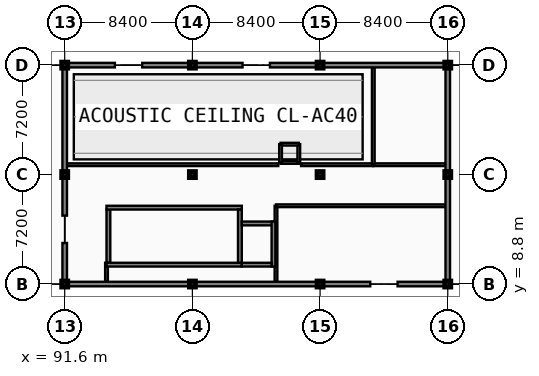
"""IFC4 building model, lengths in metres.
Left out: names, types, materials, properties, quantities, classifications, styles, units other than length and angle.
Written with IfcOpenShell. Run it as: python <this file> out.ifc"""

import sys

from ifc_helpers import new_model, si_unit, direction, frame, frame_2d, origin, origin_2d, place, context, subcontext, project, spatial, rectangle, extrude, element, fill, save


model = new_model("IFC4")
c1 = context("Model", 3, precision=1e-05, world=origin(), true_north=direction((0.0, 1.0)))
c2 = subcontext(c1, "Body", "Model", "MODEL_VIEW")
j1 = project(units=[si_unit("LENGTHUNIT", "METRE"), si_unit("PLANEANGLEUNIT", "RADIAN")], contexts=[c1])
p1 = place(None, origin())
s1 = spatial("IfcSite", under=j1, at=p1, CompositionType="ELEMENT")
p2 = place(p1, origin())
s2 = spatial("IfcBuilding", under=s1, at=p2, CompositionType="ELEMENT")
p3 = place(p2, frame((0.0, 0.0, 5.4)))
s3 = spatial("IfcBuildingStorey", under=s2, at=p3, CompositionType="ELEMENT", Elevation=5.4)
for number, where, z_axis, x_axis in (
    (1, (91.6, 8.8, 0.0), (0.0, 0.0, 1.0), (1.0, 0.0, 0.0)),
    (2, (91.6, 16.0, 0.0), (0.0, 0.0, 1.0), (1.0, 0.0, 0.0)),
    (3, (91.6, 23.2, 0.0), (0.0, 0.0, 1.0), (1.0, 0.0, 0.0)),
    (4, (100.0, 8.8, 0.0), (0.0, 0.0, 1.0), (1.0, 0.0, 0.0)),
    (5, (100.0, 16.0, 0.0), (0.0, 0.0, 1.0), (1.0, 0.0, 0.0)),
    (6, (100.0, 23.2, 0.0), (0.0, 0.0, 1.0), (1.0, 0.0, 0.0)),
    (7, (108.4, 8.8, 0.0), (0.0, 0.0, 1.0), (1.0, 0.0, 0.0)),
    (8, (108.4, 16.0, 0.0), (0.0, 0.0, 1.0), (1.0, 0.0, 0.0)),
    (9, (108.4, 23.2, 0.0), (0.0, 0.0, 1.0), (1.0, 0.0, 0.0)),
    (10, (116.8, 8.8, 0.0), (0.0, 0.0, 1.0), (1.0, 0.0, 0.0)),
    (11, (116.8, 16.0, 0.0), (0.0, 0.0, 1.0), (1.0, 0.0, 0.0)),
    (12, (116.8, 23.2, 0.0), (0.0, 0.0, 1.0), (1.0, 0.0, 0.0)),
):
    element("IfcColumn", number, at=place(p3, frame(where, z_axis=z_axis, x_axis=x_axis)), inside=s3, PredefinedType="COLUMN", context=c2, shape_type="SweptSolid", body=[
        extrude(rectangle(XDim=0.4, YDim=0.4, at=origin_2d()), origin(), (0.0, 0.0, 1.0), 4.2),
    ])
p4 = place(p3, frame((94.35, 8.96, 0.0), z_axis=(0.0, 0.0, 1.0), x_axis=(0.0, 1.0, 0.0)))
e13 = element("IfcWall", 13, at=p4, inside=s3, PredefinedType="PARTITIONING", context=c2, shape_type="SweptSolid", body=[
    extrude(rectangle(XDim=1.24, YDim=0.18, at=frame_2d((0.62, 0.0))), origin(), (0.0, 0.0, 1.0), 3.52),
])
p5 = place(p3, frame((105.5, 8.94, 0.0), z_axis=(0.0, 0.0, 1.0), x_axis=(0.0, 1.0, 0.0)))
e14 = element("IfcWall", 14, at=p5, inside=s3, PredefinedType="PARTITIONING", context=c2, shape_type="SweptSolid", body=[
    extrude(rectangle(XDim=5.01, YDim=0.18, at=frame_2d((2.505, 0.0))), origin(), (0.0, 0.0, 1.0), 3.52),
])
p6 = place(p3, frame((105.5, 13.95, 0.0), z_axis=(0.0, 0.0, 1.0), x_axis=(1.0, 0.0, 0.0)))
e15 = element("IfcWall", 15, at=p6, inside=s3, PredefinedType="PARTITIONING", context=c2, shape_type="SweptSolid", body=[
    extrude(rectangle(XDim=11.16, YDim=0.18, at=frame_2d((5.58, 0.0))), origin(), (0.0, 0.0, 1.0), 3.21),
])
p7 = place(p6, frame((5.08, 0.0, -0.01)))
e16 = element("IfcOpeningElement", 16, at=p7, cuts=e15, PredefinedType="OPENING", context=c2, shape_type="SweptSolid", body=[
    extrude(rectangle(XDim=1.0, YDim=2.16, at=frame_2d((0.5, 1.08))), frame((0.0, 0.1, 0.0), z_axis=(0.0, -1.0, 0.0), x_axis=(1.0, 0.0, 0.0)), (0.0, 0.0, 1.0), 0.2),
])
p8 = place(p3, frame((91.74, 16.65, 0.0), z_axis=(0.0, 0.0, 1.0), x_axis=(1.0, 0.0, 0.0)))
e17 = element("IfcWall", 17, at=p8, inside=s3, PredefinedType="PARTITIONING", context=c2, shape_type="SweptSolid", body=[
    extrude(rectangle(XDim=13.91, YDim=0.18, at=frame_2d((6.955, 0.0))), origin(), (0.0, 0.0, 1.0), 3.21),
])
p9 = place(p8, frame((5.54, 0.0, -0.01)))
e18 = element("IfcOpeningElement", 18, at=p9, cuts=e17, PredefinedType="OPENING", context=c2, shape_type="SweptSolid", body=[
    extrude(rectangle(XDim=1.6, YDim=2.21, at=frame_2d((0.8, 1.105))), frame((0.0, 0.1, 0.0), z_axis=(0.0, -1.0, 0.0), x_axis=(1.0, 0.0, 0.0)), (0.0, 0.0, 1.0), 0.2),
])
p10 = place(p3, frame((107.15, 16.65, 0.0), z_axis=(0.0, 0.0, 1.0), x_axis=(1.0, 0.0, 0.0)))
e19 = element("IfcWall", 19, at=p10, inside=s3, PredefinedType="PARTITIONING", context=c2, shape_type="SweptSolid", body=[
    extrude(rectangle(XDim=4.75, YDim=0.18, at=frame_2d((2.375, 0.0))), origin(), (0.0, 0.0, 1.0), 3.37),
])
p11 = place(p3, frame((111.9, 16.65, 0.0), z_axis=(0.0, 0.0, 1.0), x_axis=(1.0, 0.0, 0.0)))
e20 = element("IfcWall", 20, at=p11, inside=s3, PredefinedType="PARTITIONING", context=c2, shape_type="SweptSolid", body=[
    extrude(rectangle(XDim=4.76, YDim=0.18, at=frame_2d((2.38, 0.0))), origin(), (0.0, 0.0, 1.0), 3.21),
])
p12 = place(p11, frame((1.88, 0.0, -0.01)))
e21 = element("IfcOpeningElement", 21, at=p12, cuts=e20, PredefinedType="OPENING", context=c2, shape_type="SweptSolid", body=[
    extrude(rectangle(XDim=1.0, YDim=2.16, at=frame_2d((0.5, 1.08))), frame((0.0, 0.1, 0.0), z_axis=(0.0, -1.0, 0.0), x_axis=(1.0, 0.0, 0.0)), (0.0, 0.0, 1.0), 0.2),
])
p13 = place(p3, frame((111.9, 16.65, 0.0), z_axis=(0.0, 0.0, 1.0), x_axis=(0.0, 1.0, 0.0)))
e22 = element("IfcWall", 22, at=p13, inside=s3, PredefinedType="PARTITIONING", context=c2, shape_type="SweptSolid", body=[
    extrude(rectangle(XDim=6.41, YDim=0.18, at=frame_2d((3.205, 0.0))), origin(), (0.0, 0.0, 1.0), 3.52),
])
p14 = place(p3, frame((91.6, 8.8, 0.0), z_axis=(0.0, 0.0, 1.0), x_axis=(1.0, 0.0, 0.0)))
e23 = element("IfcWall", 23, at=p14, inside=s3, PredefinedType="SOLIDWALL", context=c2, shape_type="SweptSolid", body=[
    extrude(rectangle(XDim=8.4, YDim=0.3, at=frame_2d((4.2, 0.0))), origin(), (0.0, 0.0, 1.0), 3.21),
])
p15 = place(p14, frame((0.46, 0.0, 0.85)))
e24 = element("IfcOpeningElement", 24, at=p15, cuts=e23, PredefinedType="OPENING", context=c2, shape_type="SweptSolid", body=[
    extrude(rectangle(XDim=0.9, YDim=2.15, at=frame_2d((0.45, 1.075))), frame((0.0, 0.16, 0.0), z_axis=(0.0, -1.0, 0.0), x_axis=(1.0, 0.0, 0.0)), (0.0, 0.0, 1.0), 0.32),
])
p16 = place(p14, frame((6.86, 0.0, 0.85)))
e25 = element("IfcOpeningElement", 25, at=p16, cuts=e23, PredefinedType="OPENING", context=c2, shape_type="SweptSolid", body=[
    extrude(rectangle(XDim=0.9, YDim=2.15, at=frame_2d((0.45, 1.075))), frame((0.0, 0.16, 0.0), z_axis=(0.0, -1.0, 0.0), x_axis=(1.0, 0.0, 0.0)), (0.0, 0.0, 1.0), 0.32),
])
p17 = place(p3, frame((100.0, 8.8, 0.0), z_axis=(0.0, 0.0, 1.0), x_axis=(1.0, 0.0, 0.0)))
e26 = element("IfcWall", 26, at=p17, inside=s3, PredefinedType="SOLIDWALL", context=c2, shape_type="SweptSolid", body=[
    extrude(rectangle(XDim=8.4, YDim=0.3, at=frame_2d((4.2, 0.0))), origin(), (0.0, 0.0, 1.0), 3.37),
])
p18 = place(p17, frame((0.46, 0.0, 0.85)))
e27 = element("IfcOpeningElement", 27, at=p18, cuts=e26, PredefinedType="OPENING", context=c2, shape_type="SweptSolid", body=[
    extrude(rectangle(XDim=0.9, YDim=2.15, at=frame_2d((0.45, 1.075))), frame((0.0, 0.16, 0.0), z_axis=(0.0, -1.0, 0.0), x_axis=(1.0, 0.0, 0.0)), (0.0, 0.0, 1.0), 0.32),
])
p19 = place(p17, frame((6.86, 0.0, 0.85)))
e28 = element("IfcOpeningElement", 28, at=p19, cuts=e26, PredefinedType="OPENING", context=c2, shape_type="SweptSolid", body=[
    extrude(rectangle(XDim=0.9, YDim=2.15, at=frame_2d((0.45, 1.075))), frame((0.0, 0.16, 0.0), z_axis=(0.0, -1.0, 0.0), x_axis=(1.0, 0.0, 0.0)), (0.0, 0.0, 1.0), 0.32),
])
for number, where, z_axis, x_axis in (
    (29, (108.4, 8.8, 0.0), (0.0, 0.0, 1.0), (1.0, 0.0, 0.0)),
    (30, (113.5, 8.8, 0.0), (0.0, 0.0, 1.0), (1.0, 0.0, 0.0)),
    (31, (100.0, 23.2, 0.0), (0.0, 0.0, 1.0), (-1.0, 0.0, 0.0)),
):
    element("IfcWall", number, at=place(p3, frame(where, z_axis=z_axis, x_axis=x_axis)), inside=s3, PredefinedType="SOLIDWALL", context=c2, shape_type="SweptSolid", body=[
        extrude(rectangle(XDim=3.3, YDim=0.3, at=frame_2d((1.65, 0.0))), origin(), (0.0, 0.0, 1.0), 3.21),
    ])
p20 = place(p3, frame((94.9, 23.2, 0.0), z_axis=(0.0, 0.0, 1.0), x_axis=(-1.0, 0.0, 0.0)))
e32 = element("IfcWall", 32, at=p20, inside=s3, PredefinedType="SOLIDWALL", context=c2, shape_type="SweptSolid", body=[
    extrude(rectangle(XDim=3.3, YDim=0.3, at=frame_2d((1.65, 0.0))), origin(), (0.0, 0.0, 1.0), 3.21),
])
p21 = place(p3, frame((108.4, 23.2, 0.0), z_axis=(0.0, 0.0, 1.0), x_axis=(-1.0, 0.0, 0.0)))
e33 = element("IfcWall", 33, at=p21, inside=s3, PredefinedType="SOLIDWALL", context=c2, shape_type="SweptSolid", body=[
    extrude(rectangle(XDim=3.3, YDim=0.3, at=frame_2d((1.65, 0.0))), origin(), (0.0, 0.0, 1.0), 3.37),
])
p22 = place(p3, frame((103.3, 23.2, 0.0), z_axis=(0.0, 0.0, 1.0), x_axis=(-1.0, 0.0, 0.0)))
e34 = element("IfcWall", 34, at=p22, inside=s3, PredefinedType="SOLIDWALL", context=c2, shape_type="SweptSolid", body=[
    extrude(rectangle(XDim=3.3, YDim=0.3, at=frame_2d((1.65, 0.0))), origin(), (0.0, 0.0, 1.0), 3.37),
])
p23 = place(p3, frame((116.8, 23.2, 0.0), z_axis=(0.0, 0.0, 1.0), x_axis=(-1.0, 0.0, 0.0)))
e35 = element("IfcWall", 35, at=p23, inside=s3, PredefinedType="SOLIDWALL", context=c2, shape_type="SweptSolid", body=[
    extrude(rectangle(XDim=8.4, YDim=0.3, at=frame_2d((4.2, 0.0))), origin(), (0.0, 0.0, 1.0), 3.21),
])
p24 = place(p23, frame((0.46, 0.0, 0.85)))
e36 = element("IfcOpeningElement", 36, at=p24, cuts=e35, PredefinedType="OPENING", context=c2, shape_type="SweptSolid", body=[
    extrude(rectangle(XDim=0.9, YDim=2.15, at=frame_2d((0.45, 1.075))), frame((0.0, 0.16, 0.0), z_axis=(0.0, -1.0, 0.0), x_axis=(1.0, 0.0, 0.0)), (0.0, 0.0, 1.0), 0.32),
])
p25 = place(p23, frame((6.86, 0.0, 0.85)))
e37 = element("IfcOpeningElement", 37, at=p25, cuts=e35, PredefinedType="OPENING", context=c2, shape_type="SweptSolid", body=[
    extrude(rectangle(XDim=0.9, YDim=2.15, at=frame_2d((0.45, 1.075))), frame((0.0, 0.16, 0.0), z_axis=(0.0, -1.0, 0.0), x_axis=(1.0, 0.0, 0.0)), (0.0, 0.0, 1.0), 0.32),
])
for number, where, z_axis, x_axis in (
    (38, (91.6, 16.0, 0.0), (0.0, 0.0, 1.0), (0.0, -1.0, 0.0)),
    (39, (91.6, 11.5, 0.0), (0.0, 0.0, 1.0), (0.0, -1.0, 0.0)),
):
    element("IfcWall", number, at=place(p3, frame(where, z_axis=z_axis, x_axis=x_axis)), inside=s3, PredefinedType="SOLIDWALL", context=c2, shape_type="SweptSolid", body=[
        extrude(rectangle(XDim=2.7, YDim=0.3, at=frame_2d((1.35, 0.0))), origin(), (0.0, 0.0, 1.0), 3.21),
    ])
p26 = place(p3, frame((91.6, 23.2, 0.0), z_axis=(0.0, 0.0, 1.0), x_axis=(0.0, -1.0, 0.0)))
e40 = element("IfcWall", 40, at=p26, inside=s3, PredefinedType="SOLIDWALL", context=c2, shape_type="SweptSolid", body=[
    extrude(rectangle(XDim=7.2, YDim=0.3, at=frame_2d((3.6, 0.0))), origin(), (0.0, 0.0, 1.0), 3.21),
])
p27 = place(p26, frame((3.0, 0.0, -0.01)))
e41 = element("IfcOpeningElement", 41, at=p27, cuts=e40, PredefinedType="OPENING", context=c2, shape_type="SweptSolid", body=[
    extrude(rectangle(XDim=1.2, YDim=2.21, at=frame_2d((0.6, 1.105))), frame((0.0, 0.16, 0.0), z_axis=(0.0, -1.0, 0.0), x_axis=(1.0, 0.0, 0.0)), (0.0, 0.0, 1.0), 0.32),
])
p28 = place(p3, frame((116.8, 8.8, 0.0), z_axis=(0.0, 0.0, 1.0), x_axis=(0.0, 1.0, 0.0)))
e42 = element("IfcWall", 42, at=p28, inside=s3, PredefinedType="SOLIDWALL", context=c2, shape_type="SweptSolid", body=[
    extrude(rectangle(XDim=7.2, YDim=0.3, at=frame_2d((3.6, 0.0))), origin(), (0.0, 0.0, 1.0), 3.21),
])
p29 = place(p28, frame((3.0, 0.0, -0.01)))
e43 = element("IfcOpeningElement", 43, at=p29, cuts=e42, PredefinedType="OPENING", context=c2, shape_type="SweptSolid", body=[
    extrude(rectangle(XDim=1.2, YDim=2.21, at=frame_2d((0.6, 1.105))), frame((0.0, 0.16, 0.0), z_axis=(0.0, -1.0, 0.0), x_axis=(1.0, 0.0, 0.0)), (0.0, 0.0, 1.0), 0.32),
])
p30 = place(p3, frame((116.8, 16.0, 0.0), z_axis=(0.0, 0.0, 1.0), x_axis=(0.0, 1.0, 0.0)))
e44 = element("IfcWall", 44, at=p30, inside=s3, PredefinedType="SOLIDWALL", context=c2, shape_type="SweptSolid", body=[
    extrude(rectangle(XDim=7.2, YDim=0.3, at=frame_2d((3.6, 0.0))), origin(), (0.0, 0.0, 1.0), 3.21),
])
p31 = place(p30, frame((0.86, 0.0, 0.85)))
e45 = element("IfcOpeningElement", 45, at=p31, cuts=e44, PredefinedType="OPENING", context=c2, shape_type="SweptSolid", body=[
    extrude(rectangle(XDim=0.9, YDim=2.15, at=frame_2d((0.45, 1.075))), frame((0.0, 0.16, 0.0), z_axis=(0.0, -1.0, 0.0), x_axis=(1.0, 0.0, 0.0)), (0.0, 0.0, 1.0), 0.32),
])
p32 = place(p30, frame((5.66, 0.0, 0.85)))
e46 = element("IfcOpeningElement", 46, at=p32, cuts=e44, PredefinedType="OPENING", context=c2, shape_type="SweptSolid", body=[
    extrude(rectangle(XDim=0.9, YDim=2.15, at=frame_2d((0.45, 1.075))), frame((0.0, 0.16, 0.0), z_axis=(0.0, -1.0, 0.0), x_axis=(1.0, 0.0, 0.0)), (0.0, 0.0, 1.0), 0.32),
])
p33 = place(p3, frame((94.475, 13.7, 0.0), z_axis=(0.0, 0.0, 1.0), x_axis=(0.0, -1.0, 0.0)))
e47 = element("IfcWall", 47, at=p33, inside=s3, PredefinedType="SHEAR", context=c2, shape_type="SweptSolid", body=[
    extrude(rectangle(XDim=3.5, YDim=0.25, at=frame_2d((1.75, 0.0))), origin(), (0.0, 0.0, 1.0), 4.2),
])
p34 = place(p33, frame((1.1, 0.0, -0.01)))
e48 = element("IfcOpeningElement", 48, at=p34, cuts=e47, PredefinedType="OPENING", context=c2, shape_type="SweptSolid", body=[
    extrude(rectangle(XDim=1.3, YDim=2.16, at=frame_2d((0.65, 1.08))), frame((0.0, 0.135, 0.0), z_axis=(0.0, -1.0, 0.0), x_axis=(1.0, 0.0, 0.0)), (0.0, 0.0, 1.0), 0.27),
])
for number, where, z_axis, x_axis in (
    (49, (94.35, 10.075, 0.0), (0.0, 0.0, 1.0), (1.0, 0.0, 0.0)),
    (50, (94.35, 13.825, 0.0), (0.0, 0.0, 1.0), (1.0, 0.0, 0.0)),
):
    element("IfcWall", number, at=place(p3, frame(where, z_axis=z_axis, x_axis=x_axis)), inside=s3, PredefinedType="SHEAR", context=c2, shape_type="SweptSolid", body=[
        extrude(rectangle(XDim=8.9, YDim=0.25, at=frame_2d((4.45, 0.0))), origin(), (0.0, 0.0, 1.0), 4.2),
    ])
p35 = place(p3, frame((103.125, 10.2, 0.0), z_axis=(0.0, 0.0, 1.0), x_axis=(0.0, 1.0, 0.0)))
e51 = element("IfcWall", 51, at=p35, inside=s3, PredefinedType="SHEAR", context=c2, shape_type="SweptSolid", body=[
    extrude(rectangle(XDim=3.5, YDim=0.25, at=frame_2d((1.75, 0.0))), origin(), (0.0, 0.0, 1.0), 4.2),
])
p36 = place(p3, frame((103.25, 12.785, 0.0), z_axis=(0.0, 0.0, 1.0), x_axis=(1.0, 0.0, 0.0)))
e52 = element("IfcWall", 52, at=p36, inside=s3, PredefinedType="SHEAR", context=c2, shape_type="SweptSolid", body=[
    extrude(rectangle(XDim=2.21, YDim=0.25, at=frame_2d((1.105, 0.0))), origin(), (0.0, 0.0, 1.0), 4.2),
])
p37 = place(p3, frame((105.335, 9.95, 0.0), z_axis=(0.0, 0.0, 1.0), x_axis=(0.0, 1.0, 0.0)))
e53 = element("IfcWall", 53, at=p37, inside=s3, PredefinedType="SHEAR", context=c2, shape_type="SweptSolid", body=[
    extrude(rectangle(XDim=2.96, YDim=0.25, at=frame_2d((1.48, 0.0))), origin(), (0.0, 0.0, 1.0), 4.2),
])
p38 = place(p3, frame((103.25, 10.075, 0.0), z_axis=(0.0, 0.0, 1.0), x_axis=(1.0, 0.0, 0.0)))
e54 = element("IfcWall", 54, at=p38, inside=s3, PredefinedType="SHEAR", context=c2, shape_type="SweptSolid", body=[
    extrude(rectangle(XDim=1.96, YDim=0.25, at=frame_2d((0.98, 0.0))), origin(), (0.0, 0.0, 1.0), 4.2),
])
p39 = place(p38, frame((0.43, 0.0, -0.01)))
e55 = element("IfcOpeningElement", 55, at=p39, cuts=e54, PredefinedType="OPENING", context=c2, shape_type="SweptSolid", body=[
    extrude(rectangle(XDim=1.1, YDim=2.16, at=frame_2d((0.55, 1.08))), frame((0.0, 0.135, 0.0), z_axis=(0.0, -1.0, 0.0), x_axis=(1.0, 0.0, 0.0)), (0.0, 0.0, 1.0), 0.27),
])
p40 = place(p3, frame((105.8, 16.8, 0.0), z_axis=(0.0, 0.0, 1.0), x_axis=(1.0, 0.0, 0.0)))
e56 = element("IfcWall", 56, at=p40, inside=s3, PredefinedType="SOLIDWALL", context=c2, shape_type="SweptSolid", body=[
    extrude(rectangle(XDim=1.2, YDim=0.18, at=frame_2d((0.6, 0.0))), origin(), (0.0, 0.0, 1.0), 3.97),
])
p41 = place(p40, frame((0.2, 0.0, -0.01)))
e57 = element("IfcOpeningElement", 57, at=p41, cuts=e56, PredefinedType="OPENING", context=c2, shape_type="SweptSolid", body=[
    extrude(rectangle(XDim=0.8, YDim=2.06, at=frame_2d((0.4, 1.03))), frame((0.0, 0.1, 0.0), z_axis=(0.0, -1.0, 0.0), x_axis=(1.0, 0.0, 0.0)), (0.0, 0.0, 1.0), 0.2),
])
for number, where, z_axis, x_axis in (
    (58, (107.0, 16.8, 0.0), (0.0, 0.0, 1.0), (0.0, 1.0, 0.0)),
    (59, (107.0, 18.0, 0.0), (0.0, 0.0, 1.0), (-1.0, 0.0, 0.0)),
    (60, (105.8, 18.0, 0.0), (0.0, 0.0, 1.0), (0.0, -1.0, 0.0)),
):
    element("IfcWall", number, at=place(p3, frame(where, z_axis=z_axis, x_axis=x_axis)), inside=s3, PredefinedType="SOLIDWALL", context=c2, shape_type="SweptSolid", body=[
        extrude(rectangle(XDim=1.2, YDim=0.18, at=frame_2d((0.6, 0.0))), origin(), (0.0, 0.0, 1.0), 3.97),
    ])
p42 = place(p7, frame((1.0, 0.0, 0.01), z_axis=(0.0, 0.0, 1.0), x_axis=(-1.0, 0.0, 0.0)))
e61 = element("IfcDoor", 61, at=p42, inside=s3, OperationType="SINGLE_SWING_RIGHT", PredefinedType="DOOR", context=c2, shape_type="SweptSolid", body=[
    extrude(rectangle(XDim=1.0, YDim=2.15, at=frame_2d((0.5, 1.075))), frame((0.0, 0.025, 0.0), z_axis=(0.0, -1.0, 0.0), x_axis=(1.0, 0.0, 0.0)), (0.0, 0.0, 1.0), 0.05),
])
fill(e16, e61)
p43 = place(p9, frame((0.0, 0.0, 0.01)))
e62 = element("IfcDoor", 62, at=p43, inside=s3, OperationType="DOUBLE_SWING_LEFT", PredefinedType="DOOR", context=c2, shape_type="SweptSolid", body=[
    extrude(rectangle(XDim=1.6, YDim=2.2, at=frame_2d((0.8, 1.1))), frame((0.0, 0.025, 0.0), z_axis=(0.0, -1.0, 0.0), x_axis=(1.0, 0.0, 0.0)), (0.0, 0.0, 1.0), 0.05),
])
fill(e18, e62)
p44 = place(p12, frame((0.0, 0.0, 0.01)))
e63 = element("IfcDoor", 63, at=p44, inside=s3, OperationType="SINGLE_SWING_RIGHT", PredefinedType="DOOR", context=c2, shape_type="SweptSolid", body=[
    extrude(rectangle(XDim=1.0, YDim=2.15, at=frame_2d((0.5, 1.075))), frame((0.0, 0.025, 0.0), z_axis=(0.0, -1.0, 0.0), x_axis=(1.0, 0.0, 0.0)), (0.0, 0.0, 1.0), 0.05),
])
fill(e21, e63)
p45 = place(p15, origin())
e64 = element("IfcWindow", 64, at=p45, inside=s3, PartitioningType="SINGLE_PANEL", PredefinedType="WINDOW", context=c2, shape_type="SweptSolid", body=[
    extrude(rectangle(XDim=0.9, YDim=2.15, at=frame_2d((0.45, 1.075))), frame((0.0, 0.03, 0.0), z_axis=(0.0, -1.0, 0.0), x_axis=(1.0, 0.0, 0.0)), (0.0, 0.0, 1.0), 0.06),
])
fill(e24, e64)
p46 = place(p16, origin())
e65 = element("IfcWindow", 65, at=p46, inside=s3, PartitioningType="SINGLE_PANEL", PredefinedType="WINDOW", context=c2, shape_type="SweptSolid", body=[
    extrude(rectangle(XDim=0.9, YDim=2.15, at=frame_2d((0.45, 1.075))), frame((0.0, 0.03, 0.0), z_axis=(0.0, -1.0, 0.0), x_axis=(1.0, 0.0, 0.0)), (0.0, 0.0, 1.0), 0.06),
])
fill(e25, e65)
p47 = place(p18, origin())
e66 = element("IfcWindow", 66, at=p47, inside=s3, PartitioningType="SINGLE_PANEL", PredefinedType="WINDOW", context=c2, shape_type="SweptSolid", body=[
    extrude(rectangle(XDim=0.9, YDim=2.15, at=frame_2d((0.45, 1.075))), frame((0.0, 0.03, 0.0), z_axis=(0.0, -1.0, 0.0), x_axis=(1.0, 0.0, 0.0)), (0.0, 0.0, 1.0), 0.06),
])
fill(e27, e66)
p48 = place(p19, origin())
e67 = element("IfcWindow", 67, at=p48, inside=s3, PartitioningType="SINGLE_PANEL", PredefinedType="WINDOW", context=c2, shape_type="SweptSolid", body=[
    extrude(rectangle(XDim=0.9, YDim=2.15, at=frame_2d((0.45, 1.075))), frame((0.0, 0.03, 0.0), z_axis=(0.0, -1.0, 0.0), x_axis=(1.0, 0.0, 0.0)), (0.0, 0.0, 1.0), 0.06),
])
fill(e28, e67)
p49 = place(p24, origin())
e68 = element("IfcWindow", 68, at=p49, inside=s3, PartitioningType="SINGLE_PANEL", PredefinedType="WINDOW", context=c2, shape_type="SweptSolid", body=[
    extrude(rectangle(XDim=0.9, YDim=2.15, at=frame_2d((0.45, 1.075))), frame((0.0, 0.03, 0.0), z_axis=(0.0, -1.0, 0.0), x_axis=(1.0, 0.0, 0.0)), (0.0, 0.0, 1.0), 0.06),
])
fill(e36, e68)
p50 = place(p25, origin())
e69 = element("IfcWindow", 69, at=p50, inside=s3, PartitioningType="SINGLE_PANEL", PredefinedType="WINDOW", context=c2, shape_type="SweptSolid", body=[
    extrude(rectangle(XDim=0.9, YDim=2.15, at=frame_2d((0.45, 1.075))), frame((0.0, 0.03, 0.0), z_axis=(0.0, -1.0, 0.0), x_axis=(1.0, 0.0, 0.0)), (0.0, 0.0, 1.0), 0.06),
])
fill(e37, e69)
p51 = place(p27, frame((0.0, 0.0, 0.01)))
e70 = element("IfcDoor", 70, at=p51, inside=s3, OperationType="SINGLE_SWING_LEFT", PredefinedType="DOOR", context=c2, shape_type="SweptSolid", body=[
    extrude(rectangle(XDim=1.2, YDim=2.2, at=frame_2d((0.6, 1.1))), frame((0.0, 0.025, 0.0), z_axis=(0.0, -1.0, 0.0), x_axis=(1.0, 0.0, 0.0)), (0.0, 0.0, 1.0), 0.05),
])
fill(e41, e70)
p52 = place(p29, frame((0.0, 0.0, 0.01)))
e71 = element("IfcDoor", 71, at=p52, inside=s3, OperationType="SINGLE_SWING_RIGHT", PredefinedType="DOOR", context=c2, shape_type="SweptSolid", body=[
    extrude(rectangle(XDim=1.2, YDim=2.2, at=frame_2d((0.6, 1.1))), frame((0.0, 0.025, 0.0), z_axis=(0.0, -1.0, 0.0), x_axis=(1.0, 0.0, 0.0)), (0.0, 0.0, 1.0), 0.05),
])
fill(e43, e71)
p53 = place(p31, origin())
e72 = element("IfcWindow", 72, at=p53, inside=s3, PartitioningType="SINGLE_PANEL", PredefinedType="WINDOW", context=c2, shape_type="SweptSolid", body=[
    extrude(rectangle(XDim=0.9, YDim=2.15, at=frame_2d((0.45, 1.075))), frame((0.0, 0.03, 0.0), z_axis=(0.0, -1.0, 0.0), x_axis=(1.0, 0.0, 0.0)), (0.0, 0.0, 1.0), 0.06),
])
fill(e45, e72)
p54 = place(p32, origin())
e73 = element("IfcWindow", 73, at=p54, inside=s3, PartitioningType="SINGLE_PANEL", PredefinedType="WINDOW", context=c2, shape_type="SweptSolid", body=[
    extrude(rectangle(XDim=0.9, YDim=2.15, at=frame_2d((0.45, 1.075))), frame((0.0, 0.03, 0.0), z_axis=(0.0, -1.0, 0.0), x_axis=(1.0, 0.0, 0.0)), (0.0, 0.0, 1.0), 0.06),
])
fill(e46, e73)
p55 = place(p34, frame((1.3, 0.0, 0.01), z_axis=(0.0, 0.0, 1.0), x_axis=(-1.0, 0.0, 0.0)))
e74 = element("IfcDoor", 74, at=p55, inside=s3, OperationType="SINGLE_SWING_LEFT", PredefinedType="DOOR", context=c2, shape_type="SweptSolid", body=[
    extrude(rectangle(XDim=1.3, YDim=2.15, at=frame_2d((0.65, 1.075))), frame((0.0, 0.025, 0.0), z_axis=(0.0, -1.0, 0.0), x_axis=(1.0, 0.0, 0.0)), (0.0, 0.0, 1.0), 0.05),
])
fill(e48, e74)
p56 = place(p39, frame((0.0, 0.0, 0.01)))
e75 = element("IfcDoor", 75, at=p56, inside=s3, OperationType="SLIDING_TO_LEFT", PredefinedType="DOOR", context=c2, shape_type="SweptSolid", body=[
    extrude(rectangle(XDim=1.1, YDim=2.15, at=frame_2d((0.55, 1.075))), frame((0.0, 0.025, 0.0), z_axis=(0.0, -1.0, 0.0), x_axis=(1.0, 0.0, 0.0)), (0.0, 0.0, 1.0), 0.05),
])
fill(e55, e75)
p57 = place(p41, frame((0.0, 0.0, 0.01)))
e76 = element("IfcDoor", 76, at=p57, inside=s3, OperationType="SINGLE_SWING_LEFT", PredefinedType="DOOR", context=c2, shape_type="SweptSolid", body=[
    extrude(rectangle(XDim=0.8, YDim=2.05, at=frame_2d((0.4, 1.025))), frame((0.0, 0.025, 0.0), z_axis=(0.0, -1.0, 0.0), x_axis=(1.0, 0.0, 0.0)), (0.0, 0.0, 1.0), 0.05),
])
fill(e57, e76)
save(model, sys.argv[1])
